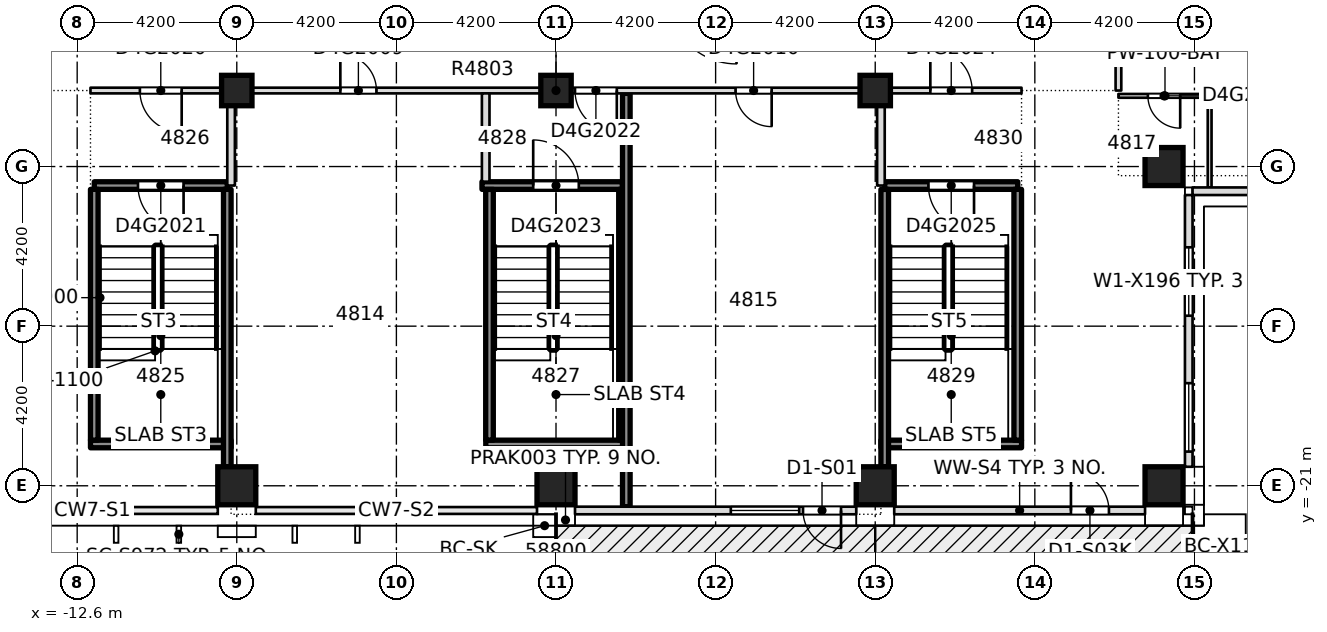
"""IFC4 building model, lengths in metres.
Left out: names, types, materials, properties, quantities, classifications, styles, units other than length and angle.
Written with IfcOpenShell. Run it as: python <this file> out.ifc"""

import sys

from ifc_helpers import new_model, si_unit, direction, frame, frame_2d, origin, origin_2d, place, context, subcontext, project, spatial, rectangle, extrude, element, fill, save


model = new_model("IFC4")
c1 = context("Model", 3, precision=1e-05, world=origin(), true_north=direction((0.0, 1.0)))
c2 = subcontext(c1, "Body", "Model", "MODEL_VIEW")
j1 = project(units=[si_unit("LENGTHUNIT", "METRE"), si_unit("PLANEANGLEUNIT", "RADIAN")], contexts=[c1])
p1 = place(None, origin())
s1 = spatial("IfcSite", under=j1, at=p1, CompositionType="ELEMENT")
p2 = place(p1, origin())
s2 = spatial("IfcBuilding", under=s1, at=p2, CompositionType="ELEMENT")
p3 = place(p2, frame((0.0, 0.0, 185.9)))
s3 = spatial("IfcBuildingStorey", under=s2, at=p3, CompositionType="ELEMENT", Elevation=185.9)
for number, where, z_axis, x_axis in (
    (1, (-8.4, -21.0, -0.4), (0.0, 0.0, 1.0), (1.0, 0.0, 0.0)),
    (2, (0.0, -21.0, -0.4), (0.0, 0.0, 1.0), (1.0, 0.0, 0.0)),
    (3, (8.4, -21.0, -0.4), (0.0, 0.0, 1.0), (1.0, 0.0, 0.0)),
    (4, (16.0, -21.0, -0.4), (0.0, 0.0, 1.0), (1.0, 0.0, 0.0)),
    (5, (16.0, -12.6, -0.4), (0.0, 0.0, 1.0), (1.0, 0.0, 0.0)),
):
    element("IfcColumn", number, at=place(p3, frame(where, z_axis=z_axis, x_axis=x_axis)), inside=s3, PredefinedType="COLUMN", context=c2, shape_type="SweptSolid", body=[
        extrude(rectangle(XDim=1.0, YDim=1.0, at=origin_2d()), origin(), (0.0, 0.0, 1.0), 3.45),
    ])
for number, where, z_axis, x_axis in (
    (6, (-8.4, -10.6, -0.4), (0.0, 0.0, 1.0), (1.0, 0.0, 0.0)),
    (7, (0.0, -10.6, -0.4), (0.0, 0.0, 1.0), (1.0, 0.0, 0.0)),
    (8, (8.4, -10.6, -0.4), (0.0, 0.0, 1.0), (1.0, 0.0, 0.0)),
):
    element("IfcColumn", number, at=place(p3, frame(where, z_axis=z_axis, x_axis=x_axis)), inside=s3, PredefinedType="COLUMN", context=c2, shape_type="SweptSolid", body=[
        extrude(rectangle(XDim=0.8, YDim=0.8, at=origin_2d()), origin(), (0.0, 0.0, 1.0), 3.45),
    ])
p4 = place(p3, frame((-1.848, -19.9, 0.0), z_axis=(0.0, 0.0, 1.0), x_axis=(1.0, 0.0, 0.0)))
e9 = element("IfcWall", 9, at=p4, inside=s3, PredefinedType="SOLIDWALL", context=c2, shape_type="SweptSolid", body=[
    extrude(rectangle(XDim=3.696, YDim=0.2, at=frame_2d((1.848, 0.0))), origin(), (0.0, 0.0, 1.0), 3.05),
])
p5 = place(p3, frame((-12.15, -13.1, 0.0), z_axis=(0.0, 0.0, 1.0), x_axis=(1.0, 0.0, 0.0)))
e10 = element("IfcWall", 10, at=p5, inside=s3, PredefinedType="SOLIDWALL", context=c2, shape_type="SweptSolid", body=[
    extrude(rectangle(XDim=3.5, YDim=0.2, at=frame_2d((1.75, 0.0))), origin(), (0.0, 0.0, 1.0), 3.05),
])
p6 = place(p5, frame((1.15, 0.0, 0.0)))
e11 = element("IfcOpeningElement", 11, at=p6, cuts=e10, PredefinedType="OPENING", context=c2, shape_type="SweptSolid", body=[
    extrude(rectangle(XDim=1.2, YDim=2.1, at=frame_2d((0.6, 1.05))), frame((0.0, 0.11, 0.0), z_axis=(0.0, -1.0, 0.0), x_axis=(1.0, 0.0, 0.0)), (0.0, 0.0, 1.0), 0.22),
])
p7 = place(p3, frame((-1.948, -13.1, 0.0), z_axis=(0.0, 0.0, 1.0), x_axis=(1.0, 0.0, 0.0)))
e12 = element("IfcWall", 12, at=p7, inside=s3, PredefinedType="SOLIDWALL", context=c2, shape_type="SweptSolid", body=[
    extrude(rectangle(XDim=3.696, YDim=0.2, at=frame_2d((1.848, 0.0))), origin(), (0.0, 0.0, 1.0), 3.05),
])
p8 = place(p7, frame((1.348, 0.0, 0.0)))
e13 = element("IfcOpeningElement", 13, at=p8, cuts=e12, PredefinedType="OPENING", context=c2, shape_type="SweptSolid", body=[
    extrude(rectangle(XDim=1.2, YDim=2.1, at=frame_2d((0.6, 1.05))), frame((0.0, 0.11, 0.0), z_axis=(0.0, -1.0, 0.0), x_axis=(1.0, 0.0, 0.0)), (0.0, 0.0, 1.0), 0.22),
])
p9 = place(p3, frame((8.65, -13.1, 0.0), z_axis=(0.0, 0.0, 1.0), x_axis=(1.0, 0.0, 0.0)))
e14 = element("IfcWall", 14, at=p9, inside=s3, PredefinedType="SOLIDWALL", context=c2, shape_type="SweptSolid", body=[
    extrude(rectangle(XDim=3.5, YDim=0.2, at=frame_2d((1.75, 0.0))), origin(), (0.0, 0.0, 1.0), 3.05),
])
p10 = place(p9, frame((1.15, 0.0, 0.0)))
e15 = element("IfcOpeningElement", 15, at=p10, cuts=e14, PredefinedType="OPENING", context=c2, shape_type="SweptSolid", body=[
    extrude(rectangle(XDim=1.2, YDim=2.1, at=frame_2d((0.6, 1.05))), frame((0.0, 0.11, 0.0), z_axis=(0.0, -1.0, 0.0), x_axis=(1.0, 0.0, 0.0)), (0.0, 0.0, 1.0), 0.22),
])
p11 = place(p3, frame((14.8, -10.74, 0.0), z_axis=(0.0, 0.0, 1.0), x_axis=(1.0, 0.0, 0.0)))
e16 = element("IfcWall", 16, at=p11, inside=s3, PredefinedType="PARTITIONING", context=c2, shape_type="SweptSolid", body=[
    extrude(rectangle(XDim=2.45, YDim=0.1, at=frame_2d((1.225, 0.0))), origin(), (0.0, 0.0, 1.0), 3.05),
])
p12 = place(p11, frame((0.775, 0.0, 0.0)))
e17 = element("IfcOpeningElement", 17, at=p12, cuts=e16, PredefinedType="OPENING", context=c2, shape_type="SweptSolid", body=[
    extrude(rectangle(XDim=0.85, YDim=2.1, at=frame_2d((0.425, 1.05))), frame((0.0, 0.06, 0.0), z_axis=(0.0, -1.0, 0.0), x_axis=(1.0, 0.0, 0.0)), (0.0, 0.0, 1.0), 0.12),
])
p13 = place(p3, frame((-12.25, -10.6, 0.0), z_axis=(0.0, 0.0, 1.0), x_axis=(1.0, 0.0, 0.0)))
e18 = element("IfcWall", 18, at=p13, inside=s3, PredefinedType="PARTITIONING", context=c2, shape_type="SweptSolid", body=[
    extrude(rectangle(XDim=24.5, YDim=0.15, at=frame_2d((12.25, 0.0))), origin(), (0.0, 0.0, 1.0), 3.05),
])
p14 = place(p13, frame((6.575, 0.0, 0.0)))
e19 = element("IfcOpeningElement", 19, at=p14, cuts=e18, PredefinedType="OPENING", context=c2, shape_type="SweptSolid", body=[
    extrude(rectangle(XDim=0.95, YDim=2.1, at=frame_2d((0.475, 1.05))), frame((0.0, 0.085, 0.0), z_axis=(0.0, -1.0, 0.0), x_axis=(1.0, 0.0, 0.0)), (0.0, 0.0, 1.0), 0.17),
])
p15 = place(p13, frame((16.975, 0.0, 0.0)))
e20 = element("IfcOpeningElement", 20, at=p15, cuts=e18, PredefinedType="OPENING", context=c2, shape_type="SweptSolid", body=[
    extrude(rectangle(XDim=0.95, YDim=2.1, at=frame_2d((0.475, 1.05))), frame((0.0, 0.085, 0.0), z_axis=(0.0, -1.0, 0.0), x_axis=(1.0, 0.0, 0.0)), (0.0, 0.0, 1.0), 0.17),
])
p16 = place(p13, frame((1.3, 0.0, 0.0)))
e21 = element("IfcOpeningElement", 21, at=p16, cuts=e18, PredefinedType="OPENING", context=c2, shape_type="SweptSolid", body=[
    extrude(rectangle(XDim=1.1, YDim=2.1, at=frame_2d((0.55, 1.05))), frame((0.0, 0.085, 0.0), z_axis=(0.0, -1.0, 0.0), x_axis=(1.0, 0.0, 0.0)), (0.0, 0.0, 1.0), 0.17),
])
p17 = place(p13, frame((12.75, 0.0, 0.0)))
e22 = element("IfcOpeningElement", 22, at=p17, cuts=e18, PredefinedType="OPENING", context=c2, shape_type="SweptSolid", body=[
    extrude(rectangle(XDim=1.1, YDim=2.1, at=frame_2d((0.55, 1.05))), frame((0.0, 0.085, 0.0), z_axis=(0.0, -1.0, 0.0), x_axis=(1.0, 0.0, 0.0)), (0.0, 0.0, 1.0), 0.17),
])
p18 = place(p13, frame((22.1, 0.0, 0.0)))
e23 = element("IfcOpeningElement", 23, at=p18, cuts=e18, PredefinedType="OPENING", context=c2, shape_type="SweptSolid", body=[
    extrude(rectangle(XDim=1.1, YDim=2.1, at=frame_2d((0.55, 1.05))), frame((0.0, 0.085, 0.0), z_axis=(0.0, -1.0, 0.0), x_axis=(1.0, 0.0, 0.0)), (0.0, 0.0, 1.0), 0.17),
])
p19 = place(p3, frame((-8.55, -13.1, 0.0), z_axis=(0.0, 0.0, 1.0), x_axis=(0.0, 1.0, 0.0)))
e24 = element("IfcWall", 24, at=p19, inside=s3, PredefinedType="PARTITIONING", context=c2, shape_type="SweptSolid", body=[
    extrude(rectangle(XDim=2.425, YDim=0.2, at=frame_2d((1.212, 0.0))), origin(), (0.0, 0.0, 1.0), 3.05),
])
p20 = place(p3, frame((-1.85, -12.998, 0.0), z_axis=(0.0, 0.0, 1.0), x_axis=(0.0, 1.0, 0.0)))
e25 = element("IfcWall", 25, at=p20, inside=s3, PredefinedType="PARTITIONING", context=c2, shape_type="SweptSolid", body=[
    extrude(rectangle(XDim=2.323, YDim=0.2, at=frame_2d((1.162, 0.0))), origin(), (0.0, 0.0, 1.0), 3.05),
])
for number, where, z_axis, x_axis in (
    (26, (-1.75, -19.798, 0.0), (0.0, 0.0, 1.0), (0.0, 1.0, 0.0)),
    (27, (1.75, -19.798, 0.0), (0.0, 0.0, 1.0), (0.0, 1.0, 0.0)),
):
    element("IfcWall", number, at=place(p3, frame(where, z_axis=z_axis, x_axis=x_axis)), inside=s3, PredefinedType="SOLIDWALL", context=c2, shape_type="SweptSolid", body=[
        extrude(rectangle(XDim=6.596, YDim=0.2, at=frame_2d((3.298, 0.0))), origin(), (0.0, 0.0, 1.0), 3.05),
    ])
p21 = place(p3, frame((8.55, -13.1, 0.0), z_axis=(0.0, 0.0, 1.0), x_axis=(0.0, 1.0, 0.0)))
e28 = element("IfcWall", 28, at=p21, inside=s3, PredefinedType="PARTITIONING", context=c2, shape_type="SweptSolid", body=[
    extrude(rectangle(XDim=2.425, YDim=0.2, at=frame_2d((1.212, 0.0))), origin(), (0.0, 0.0, 1.0), 3.05),
])
p22 = place(p3, frame((14.8, -10.6, 0.0), z_axis=(0.0, 0.0, 1.0), x_axis=(0.0, 1.0, 0.0)))
e29 = element("IfcWall", 29, at=p22, inside=s3, PredefinedType="PARTITIONING", context=c2, shape_type="SweptSolid", body=[
    extrude(rectangle(XDim=2.125, YDim=0.15, at=frame_2d((1.062, 0.0))), origin(), (0.0, 0.0, 1.0), 3.05),
])
p23 = place(p3, frame((17.2, -13.15, 0.0), z_axis=(0.0, 0.0, 1.0), x_axis=(0.0, 1.0, 0.0)))
e30 = element("IfcWall", 30, at=p23, inside=s3, PredefinedType="PARTITIONING", context=c2, shape_type="SweptSolid", body=[
    extrude(rectangle(XDim=2.36, YDim=0.1, at=frame_2d((1.18, 0.0))), origin(), (0.0, 0.0, 1.0), 3.05),
])
p24 = place(p3, frame((0.5, -21.65, 0.0), z_axis=(0.0, 0.0, 1.0), x_axis=(1.0, 0.0, 0.0)))
e31 = element("IfcWall", 31, at=p24, inside=s3, PredefinedType="STANDARD", context=c2, shape_type="SweptSolid", body=[
    extrude(rectangle(XDim=7.4, YDim=0.2, at=frame_2d((3.7, 0.0))), origin(), (0.0, 0.0, 1.0), 3.05),
])
p25 = place(p24, frame((4.1, 0.0, 0.2)))
e32 = element("IfcOpeningElement", 32, at=p25, cuts=e31, PredefinedType="OPENING", context=c2, shape_type="SweptSolid", body=[
    extrude(rectangle(XDim=1.8, YDim=2.65, at=frame_2d((0.9, 1.325))), frame((0.0, 0.11, 0.0), z_axis=(0.0, -1.0, 0.0), x_axis=(1.0, 0.0, 0.0)), (0.0, 0.0, 1.0), 0.22),
])
p26 = place(p24, frame((6.0, 0.0, 0.0)))
e33 = element("IfcOpeningElement", 33, at=p26, cuts=e31, PredefinedType="OPENING", context=c2, shape_type="SweptSolid", body=[
    extrude(rectangle(XDim=1.0, YDim=2.4, at=frame_2d((0.5, 1.2))), frame((0.0, 0.11, 0.0), z_axis=(0.0, -1.0, 0.0), x_axis=(1.0, 0.0, 0.0)), (0.0, 0.0, 1.0), 0.22),
])
p27 = place(p3, frame((8.9, -21.65, 0.0), z_axis=(0.0, 0.0, 1.0), x_axis=(1.0, 0.0, 0.0)))
e34 = element("IfcWall", 34, at=p27, inside=s3, PredefinedType="STANDARD", context=c2, shape_type="SweptSolid", body=[
    extrude(rectangle(XDim=6.6, YDim=0.2, at=frame_2d((3.3, 0.0))), origin(), (0.0, 0.0, 1.0), 3.05),
])
p28 = place(p27, frame((4.65, 0.0, 0.0)))
e35 = element("IfcOpeningElement", 35, at=p28, cuts=e34, PredefinedType="OPENING", context=c2, shape_type="SweptSolid", body=[
    extrude(rectangle(XDim=1.0, YDim=2.4, at=frame_2d((0.5, 1.2))), frame((0.0, 0.11, 0.0), z_axis=(0.0, -1.0, 0.0), x_axis=(1.0, 0.0, 0.0)), (0.0, 0.0, 1.0), 0.22),
])
p29 = place(p3, frame((16.65, -20.5, 0.0), z_axis=(0.0, 0.0, 1.0), x_axis=(0.0, 1.0, 0.0)))
e36 = element("IfcWall", 36, at=p29, inside=s3, PredefinedType="STANDARD", context=c2, shape_type="SweptSolid", body=[
    extrude(rectangle(XDim=7.15, YDim=0.2, at=frame_2d((3.575, 0.0))), origin(), (0.0, 0.0, 1.0), 3.05),
])
p30 = place(p29, frame((0.4, 0.0, 0.2)))
e37 = element("IfcOpeningElement", 37, at=p30, cuts=e36, PredefinedType="OPENING", context=c2, shape_type="SweptSolid", body=[
    extrude(rectangle(XDim=1.8, YDim=2.65, at=frame_2d((0.9, 1.325))), frame((0.0, 0.11, 0.0), z_axis=(0.0, -1.0, 0.0), x_axis=(1.0, 0.0, 0.0)), (0.0, 0.0, 1.0), 0.22),
])
p31 = place(p29, frame((3.975, 0.0, 0.2)))
e38 = element("IfcOpeningElement", 38, at=p31, cuts=e36, PredefinedType="OPENING", context=c2, shape_type="SweptSolid", body=[
    extrude(rectangle(XDim=1.8, YDim=2.65, at=frame_2d((0.9, 1.325))), frame((0.0, 0.11, 0.0), z_axis=(0.0, -1.0, 0.0), x_axis=(1.0, 0.0, 0.0)), (0.0, 0.0, 1.0), 0.22),
])
p32 = place(p3, frame((16.75, -13.25, 0.0), z_axis=(0.0, 0.0, 1.0), x_axis=(1.0, 0.0, 0.0)))
e39 = element("IfcWall", 39, at=p32, inside=s3, PredefinedType="STANDARD", context=c2, shape_type="SweptSolid", body=[
    extrude(rectangle(XDim=7.95, YDim=0.2, at=frame_2d((3.975, 0.0))), origin(), (0.0, 0.0, 1.0), 3.05),
])
p33 = place(p3, frame((-12.25, -19.9, 0.0), z_axis=(0.0, 0.0, 1.0), x_axis=(1.0, 0.0, 0.0)))
e40 = element("IfcWall", 40, at=p33, inside=s3, PredefinedType="SOLIDWALL", context=c2, shape_type="SweptSolid", body=[
    extrude(rectangle(XDim=3.7, YDim=0.2, at=frame_2d((1.85, 0.0))), origin(), (0.0, 0.0, 1.0), 3.05),
])
p34 = place(p3, frame((-12.15, -19.8, 0.0), z_axis=(0.0, 0.0, 1.0), x_axis=(0.0, 1.0, 0.0)))
e41 = element("IfcWall", 41, at=p34, inside=s3, PredefinedType="SOLIDWALL", context=c2, shape_type="SweptSolid", body=[
    extrude(rectangle(XDim=6.6, YDim=0.2, at=frame_2d((3.3, 0.0))), origin(), (0.0, 0.0, 1.0), 3.05),
])
p35 = place(p3, frame((-8.65, -20.5, 0.0), z_axis=(0.0, 0.0, 1.0), x_axis=(0.0, 1.0, 0.0)))
e42 = element("IfcWall", 42, at=p35, inside=s3, PredefinedType="SOLIDWALL", context=c2, shape_type="SweptSolid", body=[
    extrude(rectangle(XDim=7.3, YDim=0.2, at=frame_2d((3.65, 0.0))), origin(), (0.0, 0.0, 1.0), 3.05),
])
p36 = place(p3, frame((8.55, -19.9, 0.0), z_axis=(0.0, 0.0, 1.0), x_axis=(1.0, 0.0, 0.0)))
e43 = element("IfcWall", 43, at=p36, inside=s3, PredefinedType="SOLIDWALL", context=c2, shape_type="SweptSolid", body=[
    extrude(rectangle(XDim=3.7, YDim=0.2, at=frame_2d((1.85, 0.0))), origin(), (0.0, 0.0, 1.0), 3.05),
])
p37 = place(p3, frame((12.15, -19.8, 0.0), z_axis=(0.0, 0.0, 1.0), x_axis=(0.0, 1.0, 0.0)))
e44 = element("IfcWall", 44, at=p37, inside=s3, PredefinedType="SOLIDWALL", context=c2, shape_type="SweptSolid", body=[
    extrude(rectangle(XDim=6.6, YDim=0.2, at=frame_2d((3.3, 0.0))), origin(), (0.0, 0.0, 1.0), 3.05),
])
p38 = place(p3, frame((1.85, -21.55, 0.0), z_axis=(0.0, 0.0, 1.0), x_axis=(0.0, 1.0, 0.0)))
e45 = element("IfcWall", 45, at=p38, inside=s3, PredefinedType="SOLIDWALL", context=c2, shape_type="SweptSolid", body=[
    extrude(rectangle(XDim=10.875, YDim=0.2, at=frame_2d((5.438, 0.0))), origin(), (0.0, 0.0, 1.0), 3.05),
])
p39 = place(p3, frame((8.65, -20.5, 0.0), z_axis=(0.0, 0.0, 1.0), x_axis=(0.0, 1.0, 0.0)))
e46 = element("IfcWall", 46, at=p39, inside=s3, PredefinedType="SOLIDWALL", context=c2, shape_type="SweptSolid", body=[
    extrude(rectangle(XDim=7.298, YDim=0.2, at=frame_2d((3.649, 0.0))), origin(), (0.0, 0.0, 1.0), 3.05),
])
p40 = place(p14, origin())
e47 = element("IfcDoor", 47, at=p40, inside=s3, OperationType="SINGLE_SWING_RIGHT", PredefinedType="DOOR", context=c2, shape_type="SweptSolid", body=[
    extrude(rectangle(XDim=0.95, YDim=2.1, at=frame_2d((0.475, 1.05))), frame((0.0, 0.025, 0.0), z_axis=(0.0, -1.0, 0.0), x_axis=(1.0, 0.0, 0.0)), (0.0, 0.0, 1.0), 0.05),
])
fill(e19, e47)
p41 = place(p15, origin())
e48 = element("IfcDoor", 48, at=p41, inside=s3, OperationType="SINGLE_SWING_RIGHT", PredefinedType="DOOR", context=c2, shape_type="SweptSolid", body=[
    extrude(rectangle(XDim=0.95, YDim=2.1, at=frame_2d((0.475, 1.05))), frame((0.0, 0.025, 0.0), z_axis=(0.0, -1.0, 0.0), x_axis=(1.0, 0.0, 0.0)), (0.0, 0.0, 1.0), 0.05),
])
fill(e20, e48)
p42 = place(p12, origin())
e49 = element("IfcDoor", 49, at=p42, inside=s3, OperationType="SINGLE_SWING_RIGHT", PredefinedType="DOOR", context=c2, shape_type="SweptSolid", body=[
    extrude(rectangle(XDim=0.85, YDim=2.1, at=frame_2d((0.425, 1.05))), frame((0.0, 0.025, 0.0), z_axis=(0.0, -1.0, 0.0), x_axis=(1.0, 0.0, 0.0)), (0.0, 0.0, 1.0), 0.05),
])
fill(e17, e49)
p43 = place(p16, origin())
e50 = element("IfcDoor", 50, at=p43, inside=s3, OperationType="SINGLE_SWING_RIGHT", PredefinedType="DOOR", context=c2, shape_type="SweptSolid", body=[
    extrude(rectangle(XDim=1.1, YDim=2.1, at=frame_2d((0.55, 1.05))), frame((0.0, 0.025, 0.0), z_axis=(0.0, -1.0, 0.0), x_axis=(1.0, 0.0, 0.0)), (0.0, 0.0, 1.0), 0.05),
])
fill(e21, e50)
p44 = place(p6, origin())
e51 = element("IfcDoor", 51, at=p44, inside=s3, OperationType="SINGLE_SWING_RIGHT", PredefinedType="DOOR", context=c2, shape_type="SweptSolid", body=[
    extrude(rectangle(XDim=1.2, YDim=2.1, at=frame_2d((0.6, 1.05))), frame((0.0, 0.025, 0.0), z_axis=(0.0, -1.0, 0.0), x_axis=(1.0, 0.0, 0.0)), (0.0, 0.0, 1.0), 0.05),
])
fill(e11, e51)
p45 = place(p17, origin())
e52 = element("IfcDoor", 52, at=p45, inside=s3, OperationType="SINGLE_SWING_LEFT", PredefinedType="DOOR", context=c2, shape_type="SweptSolid", body=[
    extrude(rectangle(XDim=1.1, YDim=2.1, at=frame_2d((0.55, 1.05))), frame((0.0, 0.025, 0.0), z_axis=(0.0, -1.0, 0.0), x_axis=(1.0, 0.0, 0.0)), (0.0, 0.0, 1.0), 0.05),
])
fill(e22, e52)
p46 = place(p8, origin())
e53 = element("IfcDoor", 53, at=p46, inside=s3, OperationType="SINGLE_SWING_RIGHT", PredefinedType="DOOR", context=c2, shape_type="SweptSolid", body=[
    extrude(rectangle(XDim=1.2, YDim=2.1, at=frame_2d((0.6, 1.05))), frame((0.0, 0.025, 0.0), z_axis=(0.0, -1.0, 0.0), x_axis=(1.0, 0.0, 0.0)), (0.0, 0.0, 1.0), 0.05),
])
fill(e13, e53)
p47 = place(p18, origin())
e54 = element("IfcDoor", 54, at=p47, inside=s3, OperationType="SINGLE_SWING_LEFT", PredefinedType="DOOR", context=c2, shape_type="SweptSolid", body=[
    extrude(rectangle(XDim=1.1, YDim=2.1, at=frame_2d((0.55, 1.05))), frame((0.0, 0.025, 0.0), z_axis=(0.0, -1.0, 0.0), x_axis=(1.0, 0.0, 0.0)), (0.0, 0.0, 1.0), 0.05),
])
fill(e23, e54)
p48 = place(p10, origin())
e55 = element("IfcDoor", 55, at=p48, inside=s3, OperationType="SINGLE_SWING_RIGHT", PredefinedType="DOOR", context=c2, shape_type="SweptSolid", body=[
    extrude(rectangle(XDim=1.2, YDim=2.1, at=frame_2d((0.6, 1.05))), frame((0.0, 0.025, 0.0), z_axis=(0.0, -1.0, 0.0), x_axis=(1.0, 0.0, 0.0)), (0.0, 0.0, 1.0), 0.05),
])
fill(e15, e55)
p49 = place(p25, origin())
e56 = element("IfcWindow", 56, at=p49, inside=s3, PartitioningType="SINGLE_PANEL", PredefinedType="WINDOW", context=c2, shape_type="SweptSolid", body=[
    extrude(rectangle(XDim=1.8, YDim=2.65, at=frame_2d((0.9, 1.325))), frame((0.0, 0.03, 0.0), z_axis=(0.0, -1.0, 0.0), x_axis=(1.0, 0.0, 0.0)), (0.0, 0.0, 1.0), 0.06),
])
fill(e32, e56)
p50 = place(p26, origin())
e57 = element("IfcDoor", 57, at=p50, inside=s3, OperationType="SINGLE_SWING_LEFT", PredefinedType="DOOR", context=c2, shape_type="SweptSolid", body=[
    extrude(rectangle(XDim=1.0, YDim=2.4, at=frame_2d((0.5, 1.2))), frame((0.0, 0.025, 0.0), z_axis=(0.0, -1.0, 0.0), x_axis=(1.0, 0.0, 0.0)), (0.0, 0.0, 1.0), 0.05),
])
fill(e33, e57)
p51 = place(p28, origin())
e58 = element("IfcDoor", 58, at=p51, inside=s3, OperationType="SINGLE_SWING_LEFT", PredefinedType="DOOR", context=c2, shape_type="SweptSolid", body=[
    extrude(rectangle(XDim=1.0, YDim=2.4, at=frame_2d((0.5, 1.2))), frame((0.0, 0.025, 0.0), z_axis=(0.0, -1.0, 0.0), x_axis=(1.0, 0.0, 0.0)), (0.0, 0.0, 1.0), 0.05),
])
fill(e35, e58)
p52 = place(p30, origin())
e59 = element("IfcWindow", 59, at=p52, inside=s3, PartitioningType="SINGLE_PANEL", PredefinedType="WINDOW", context=c2, shape_type="SweptSolid", body=[
    extrude(rectangle(XDim=1.8, YDim=2.65, at=frame_2d((0.9, 1.325))), frame((0.0, 0.03, 0.0), z_axis=(0.0, -1.0, 0.0), x_axis=(1.0, 0.0, 0.0)), (0.0, 0.0, 1.0), 0.06),
])
fill(e37, e59)
p53 = place(p31, origin())
e60 = element("IfcWindow", 60, at=p53, inside=s3, PartitioningType="SINGLE_PANEL", PredefinedType="WINDOW", context=c2, shape_type="SweptSolid", body=[
    extrude(rectangle(XDim=1.8, YDim=2.65, at=frame_2d((0.9, 1.325))), frame((0.0, 0.03, 0.0), z_axis=(0.0, -1.0, 0.0), x_axis=(1.0, 0.0, 0.0)), (0.0, 0.0, 1.0), 0.06),
])
fill(e38, e60)
save(model, sys.argv[1])
